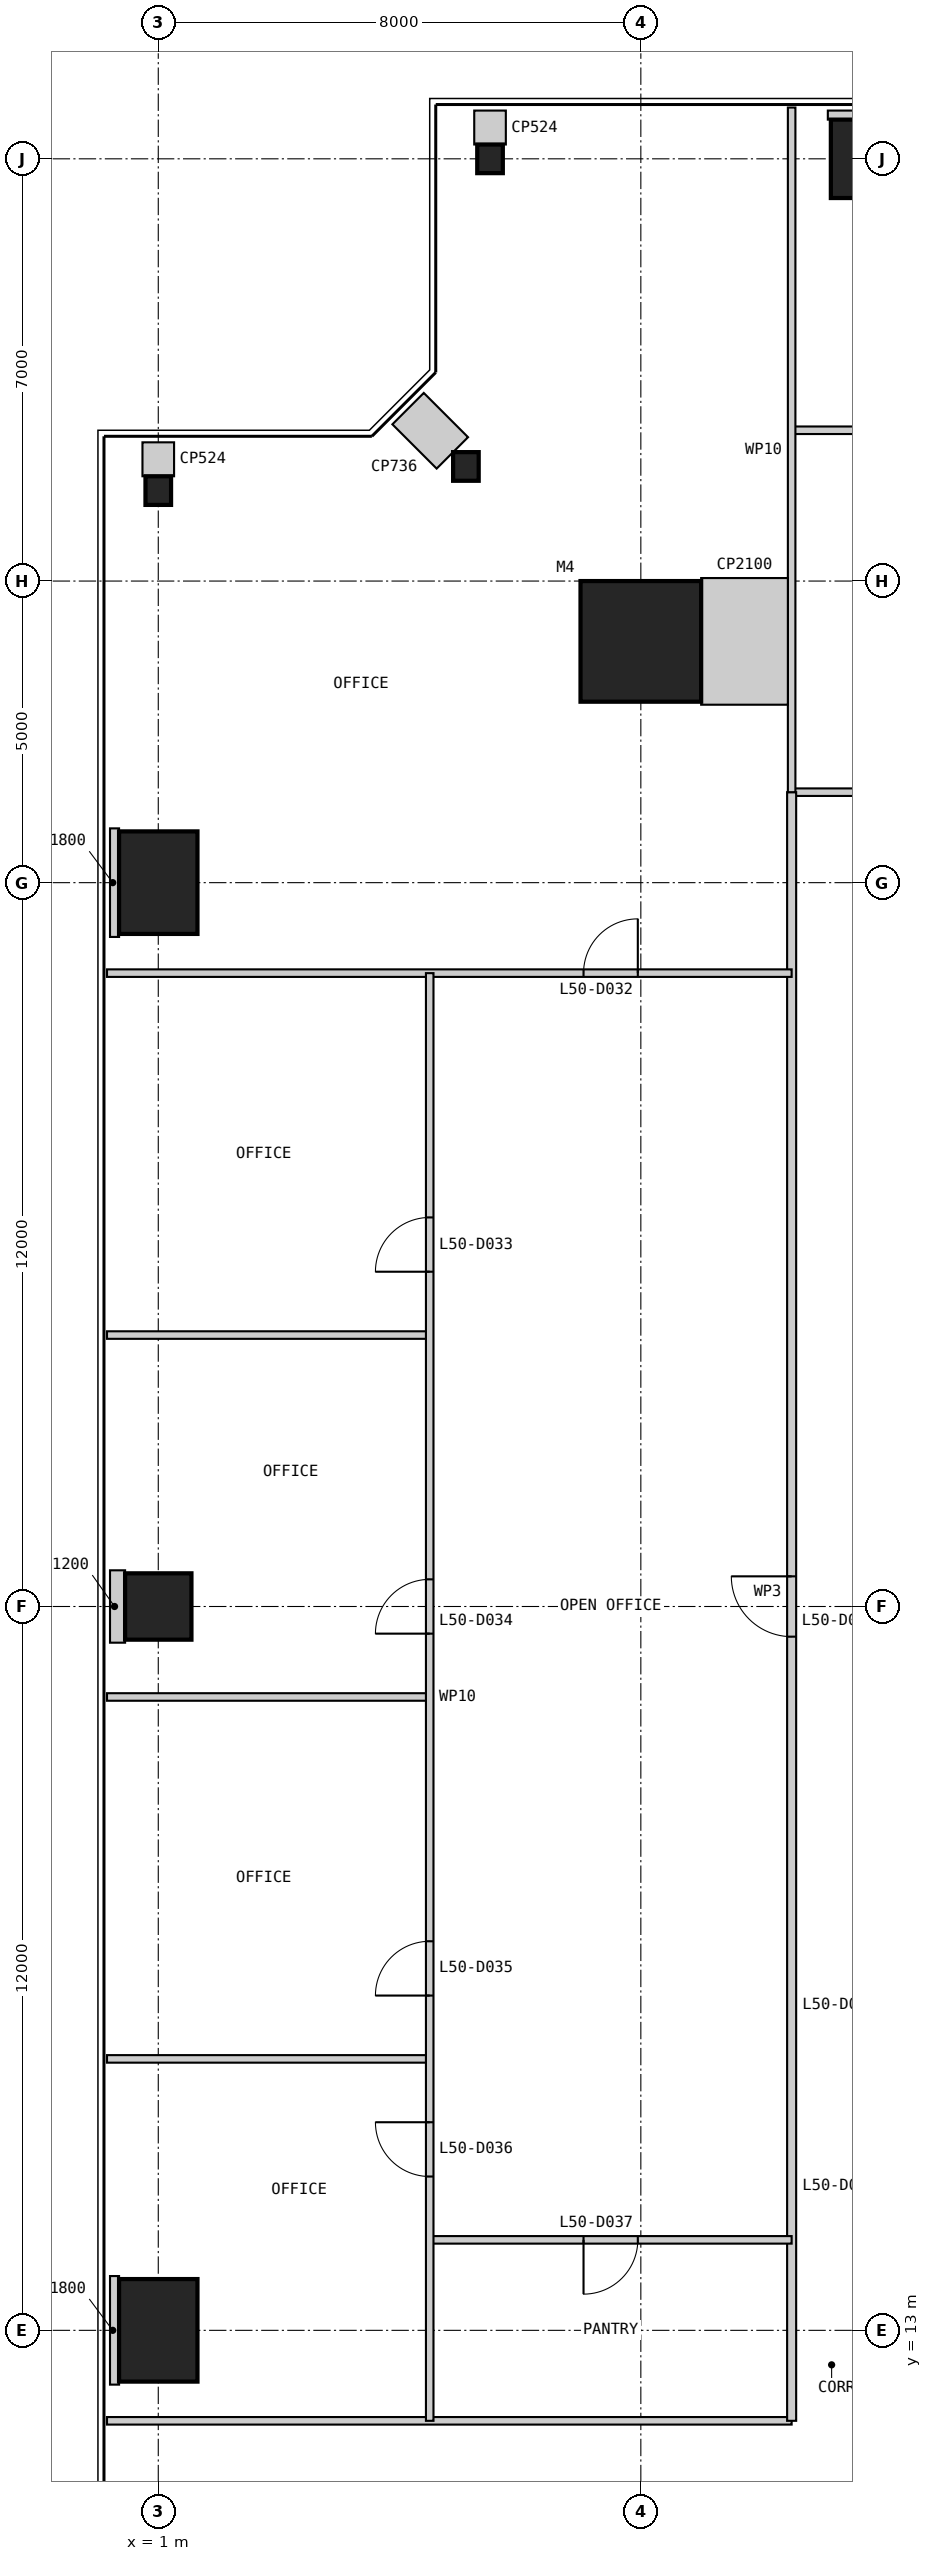
"""IFC4 building model, lengths in metres.
Left out: names, types, materials, properties, quantities, classifications, styles, units other than length and angle.
Written with IfcOpenShell. Run it as: python <this file> out.ifc"""

import sys

from ifc_helpers import new_model, si_unit, direction, frame, frame_2d, origin, origin_2d, place, context, subcontext, project, spatial, rectangle, i_section, extrude, element, fill, save


model = new_model("IFC4")
c1 = context("Model", 3, precision=1e-05, world=origin(), true_north=direction((0.0, 1.0)))
c2 = subcontext(c1, "Body", "Model", "MODEL_VIEW")
j1 = project(units=[si_unit("LENGTHUNIT", "METRE"), si_unit("PLANEANGLEUNIT", "RADIAN")], contexts=[c1])
p1 = place(None, origin())
s1 = spatial("IfcSite", under=j1, at=p1, CompositionType="ELEMENT")
p2 = place(p1, origin())
s2 = spatial("IfcBuilding", under=s1, at=p2, CompositionType="ELEMENT")
p3 = place(p2, frame((0.0, 0.0, 213.8)))
s3 = spatial("IfcBuildingStorey", under=s2, at=p3, CompositionType="ELEMENT", Elevation=213.8)
p4 = place(p3, frame((9.0, 41.0, 0.0), z_axis=(0.0, 0.0, 1.0), x_axis=(1.0, 0.0, 0.0)))
e1 = element("IfcColumn", 1, at=p4, inside=s3, PredefinedType="COLUMN", context=c2, shape_type="SweptSolid", body=[
    extrude(rectangle(XDim=2.0, YDim=2.0, at=origin_2d()), origin(), (0.0, 0.0, 1.0), 4.0),
])
p5 = place(p3, frame((13.0, 49.0, 0.0), z_axis=(0.0, 0.0, 1.0), x_axis=(1.0, 0.0, 0.0)))
e2 = element("IfcColumn", 2, at=p5, inside=s3, PredefinedType="COLUMN", context=c2, shape_type="SweptSolid", body=[
    extrude(rectangle(XDim=1.7, YDim=1.3, at=origin_2d()), origin(), (0.0, 0.0, 1.0), 4.0),
])
for number, where, z_axis, x_axis in (
    (3, (6.5, 49.0, 0.0), (0.0, 0.0, 1.0), (1.0, 0.0, 0.0)),
    (4, (6.1, 43.9, 0.0), (0.0, 0.0, 1.0), (1.0, 0.0, 0.0)),
    (5, (1.0, 43.5, 0.0), (0.0, 0.0, 1.0), (1.0, 0.0, 0.0)),
):
    element("IfcColumn", number, at=place(p3, frame(where, z_axis=z_axis, x_axis=x_axis)), inside=s3, PredefinedType="COLUMN", context=c2, shape_type="SweptSolid", body=[
        extrude(i_section(OverallWidth=0.424, OverallDepth=0.475, WebThickness=0.048, FlangeThickness=0.077, at=origin_2d()), origin(), (0.0, 0.0, 1.0), 4.0),
    ])
p6 = place(p3, frame((1.0, 37.0, 0.0), z_axis=(0.0, 0.0, 1.0), x_axis=(1.0, 0.0, 0.0)))
e6 = element("IfcColumn", 6, at=p6, inside=s3, PredefinedType="COLUMN", context=c2, shape_type="SweptSolid", body=[
    extrude(rectangle(XDim=1.3, YDim=1.7, at=origin_2d()), origin(), (0.0, 0.0, 1.0), 4.0),
])
p7 = place(p3, frame((1.0, 25.0, 0.0), z_axis=(0.0, 0.0, 1.0), x_axis=(1.0, 0.0, 0.0)))
e7 = element("IfcColumn", 7, at=p7, inside=s3, PredefinedType="COLUMN", context=c2, shape_type="SweptSolid", body=[
    extrude(rectangle(XDim=1.1, YDim=1.1, at=origin_2d()), origin(), (0.0, 0.0, 1.0), 4.0),
])
p8 = place(p3, frame((1.0, 13.0, 0.0), z_axis=(0.0, 0.0, 1.0), x_axis=(1.0, 0.0, 0.0)))
e8 = element("IfcColumn", 8, at=p8, inside=s3, PredefinedType="COLUMN", context=c2, shape_type="SweptSolid", body=[
    extrude(rectangle(XDim=1.3, YDim=1.7, at=origin_2d()), origin(), (0.0, 0.0, 1.0), 4.0),
])
p9 = place(p3, frame((0.15, 11.5, 0.0), z_axis=(0.0, 0.0, 1.0), x_axis=(1.0, 0.0, 0.0)))
e9 = element("IfcWall", 9, at=p9, inside=s3, PredefinedType="PARTITIONING", context=c2, shape_type="SweptSolid", body=[
    extrude(rectangle(XDim=11.35, YDim=0.125, at=frame_2d((5.675, 0.0))), origin(), (0.0, 0.0, 1.0), 3.85),
])
p10 = place(p3, frame((17.5, 44.5, 0.0), z_axis=(0.0, 0.0, 1.0), x_axis=(-1.0, 0.0, 0.0)))
e10 = element("IfcWall", 10, at=p10, inside=s3, PredefinedType="PARTITIONING", context=c2, shape_type="SweptSolid", body=[
    extrude(rectangle(XDim=6.0, YDim=0.125, at=frame_2d((3.0, 0.0))), origin(), (0.0, 0.0, 1.0), 3.85),
])
p11 = place(p3, frame((14.5, 38.5, 0.0), z_axis=(0.0, 0.0, 1.0), x_axis=(-1.0, 0.0, 0.0)))
e11 = element("IfcWall", 11, at=p11, inside=s3, PredefinedType="PARTITIONING", context=c2, shape_type="SweptSolid", body=[
    extrude(rectangle(XDim=3.0, YDim=0.125, at=frame_2d((1.5, 0.0))), origin(), (0.0, 0.0, 1.0), 3.85),
])
p12 = place(p3, frame((11.5, 38.5, 0.0), z_axis=(0.0, 0.0, 1.0), x_axis=(0.0, -1.0, 0.0)))
e12 = element("IfcWall", 12, at=p12, inside=s3, PredefinedType="PARTITIONING", context=c2, shape_type="SweptSolid", body=[
    extrude(rectangle(XDim=27.0, YDim=0.15, at=frame_2d((13.5, 0.0))), origin(), (0.0, 0.0, 1.0), 3.85),
])
p13 = place(p12, frame((13.0, 0.0, 0.0)))
e13 = element("IfcOpeningElement", 13, at=p13, cuts=e12, PredefinedType="OPENING", context=c2, shape_type="SweptSolid", body=[
    extrude(rectangle(XDim=1.0, YDim=2.2, at=frame_2d((0.5, 1.1))), frame((0.0, 0.085, 0.0), z_axis=(0.0, -1.0, 0.0), x_axis=(1.0, 0.0, 0.0)), (0.0, 0.0, 1.0), 0.17),
])
p14 = place(p3, frame((11.5, 49.85, 0.0), z_axis=(0.0, 0.0, 1.0), x_axis=(0.0, -1.0, 0.0)))
e14 = element("IfcWall", 14, at=p14, inside=s3, PredefinedType="PARTITIONING", context=c2, shape_type="SweptSolid", body=[
    extrude(rectangle(XDim=11.35, YDim=0.125, at=frame_2d((5.675, 0.0))), origin(), (0.0, 0.0, 1.0), 3.85),
])
p15 = place(p3, frame((0.15, 35.5, 0.0), z_axis=(0.0, 0.0, 1.0), x_axis=(1.0, 0.0, 0.0)))
e15 = element("IfcWall", 15, at=p15, inside=s3, PredefinedType="PARTITIONING", context=c2, shape_type="SweptSolid", body=[
    extrude(rectangle(XDim=11.35, YDim=0.125, at=frame_2d((5.675, 0.0))), origin(), (0.0, 0.0, 1.0), 3.85),
])
p16 = place(p15, frame((7.9, 0.0, 0.0)))
e16 = element("IfcOpeningElement", 16, at=p16, cuts=e15, PredefinedType="OPENING", context=c2, shape_type="SweptSolid", body=[
    extrude(rectangle(XDim=0.9, YDim=2.2, at=frame_2d((0.45, 1.1))), frame((0.0, 0.073, 0.0), z_axis=(0.0, -1.0, 0.0), x_axis=(1.0, 0.0, 0.0)), (0.0, 0.0, 1.0), 0.145),
])
for number, where, z_axis, x_axis in (
    (17, (0.15, 29.5, 0.0), (0.0, 0.0, 1.0), (1.0, 0.0, 0.0)),
    (18, (0.15, 23.5, 0.0), (0.0, 0.0, 1.0), (1.0, 0.0, 0.0)),
    (19, (0.15, 17.5, 0.0), (0.0, 0.0, 1.0), (1.0, 0.0, 0.0)),
):
    element("IfcWall", number, at=place(p3, frame(where, z_axis=z_axis, x_axis=x_axis)), inside=s3, PredefinedType="PARTITIONING", context=c2, shape_type="SweptSolid", body=[
        extrude(rectangle(XDim=5.35, YDim=0.125, at=frame_2d((2.675, 0.0))), origin(), (0.0, 0.0, 1.0), 3.85),
    ])
p17 = place(p3, frame((5.5, 14.5, 0.0), z_axis=(0.0, 0.0, 1.0), x_axis=(1.0, 0.0, 0.0)))
e20 = element("IfcWall", 20, at=p17, inside=s3, PredefinedType="PARTITIONING", context=c2, shape_type="SweptSolid", body=[
    extrude(rectangle(XDim=6.0, YDim=0.125, at=frame_2d((3.0, 0.0))), origin(), (0.0, 0.0, 1.0), 3.85),
])
p18 = place(p17, frame((2.55, 0.0, 0.0)))
e21 = element("IfcOpeningElement", 21, at=p18, cuts=e20, PredefinedType="OPENING", context=c2, shape_type="SweptSolid", body=[
    extrude(rectangle(XDim=0.9, YDim=2.2, at=frame_2d((0.45, 1.1))), frame((0.0, 0.073, 0.0), z_axis=(0.0, -1.0, 0.0), x_axis=(1.0, 0.0, 0.0)), (0.0, 0.0, 1.0), 0.145),
])
p19 = place(p3, frame((5.5, 35.5, 0.0), z_axis=(0.0, 0.0, 1.0), x_axis=(0.0, -1.0, 0.0)))
e22 = element("IfcWall", 22, at=p19, inside=s3, PredefinedType="PARTITIONING", context=c2, shape_type="SweptSolid", body=[
    extrude(rectangle(XDim=24.0, YDim=0.125, at=frame_2d((12.0, 0.0))), origin(), (0.0, 0.0, 1.0), 3.85),
])
p20 = place(p19, frame((4.05, 0.0, 0.0)))
e23 = element("IfcOpeningElement", 23, at=p20, cuts=e22, PredefinedType="OPENING", context=c2, shape_type="SweptSolid", body=[
    extrude(rectangle(XDim=0.9, YDim=2.2, at=frame_2d((0.45, 1.1))), frame((0.0, 0.073, 0.0), z_axis=(0.0, -1.0, 0.0), x_axis=(1.0, 0.0, 0.0)), (0.0, 0.0, 1.0), 0.145),
])
p21 = place(p19, frame((10.05, 0.0, 0.0)))
e24 = element("IfcOpeningElement", 24, at=p21, cuts=e22, PredefinedType="OPENING", context=c2, shape_type="SweptSolid", body=[
    extrude(rectangle(XDim=0.9, YDim=2.2, at=frame_2d((0.45, 1.1))), frame((0.0, 0.073, 0.0), z_axis=(0.0, -1.0, 0.0), x_axis=(1.0, 0.0, 0.0)), (0.0, 0.0, 1.0), 0.145),
])
p22 = place(p19, frame((16.05, 0.0, 0.0)))
e25 = element("IfcOpeningElement", 25, at=p22, cuts=e22, PredefinedType="OPENING", context=c2, shape_type="SweptSolid", body=[
    extrude(rectangle(XDim=0.9, YDim=2.2, at=frame_2d((0.45, 1.1))), frame((0.0, 0.073, 0.0), z_axis=(0.0, -1.0, 0.0), x_axis=(1.0, 0.0, 0.0)), (0.0, 0.0, 1.0), 0.145),
])
p23 = place(p19, frame((19.05, 0.0, 0.0)))
e26 = element("IfcOpeningElement", 26, at=p23, cuts=e22, PredefinedType="OPENING", context=c2, shape_type="SweptSolid", body=[
    extrude(rectangle(XDim=0.9, YDim=2.2, at=frame_2d((0.45, 1.1))), frame((0.0, 0.073, 0.0), z_axis=(0.0, -1.0, 0.0), x_axis=(1.0, 0.0, 0.0)), (0.0, 0.0, 1.0), 0.145),
])
p24 = place(p3, frame((13.0, 49.8, 0.0), z_axis=(0.0, 0.0, 1.0), x_axis=(0.0, -1.0, 0.0)))
e27 = element("IfcWall", 27, at=p24, inside=s3, PredefinedType="PARTITIONING", context=c2, shape_type="SweptSolid", body=[
    extrude(rectangle(XDim=0.15, YDim=1.8, at=frame_2d((0.075, 0.0))), origin(), (0.0, 0.0, 1.0), 3.85),
])
p25 = place(p3, frame((11.438, 41.0, 0.0), z_axis=(0.0, 0.0, 1.0), x_axis=(-1.0, 0.0, 0.0)))
e28 = element("IfcWall", 28, at=p25, inside=s3, PredefinedType="PARTITIONING", context=c2, shape_type="SweptSolid", body=[
    extrude(rectangle(XDim=1.438, YDim=2.1, at=frame_2d((0.719, 0.0))), origin(), (0.0, 0.0, 1.0), 3.85),
])
p26 = place(p3, frame((6.5, 49.8, 0.0), z_axis=(0.0, 0.0, 1.0), x_axis=(0.0, -1.0, 0.0)))
e29 = element("IfcWall", 29, at=p26, inside=s3, PredefinedType="PARTITIONING", context=c2, shape_type="SweptSolid", body=[
    extrude(rectangle(XDim=0.562, YDim=0.524, at=frame_2d((0.281, 0.0))), origin(), (0.0, 0.0, 1.0), 3.85),
])
p27 = place(p3, frame((5.141, 44.859, 0.0), z_axis=(0.0, 0.0, 1.0), x_axis=(0.707106781187, -0.707106781187, 0.0)))
e30 = element("IfcWall", 30, at=p27, inside=s3, PredefinedType="PARTITIONING", context=c2, shape_type="SweptSolid", body=[
    extrude(rectangle(XDim=1.038, YDim=0.736, at=frame_2d((0.519, 0.0))), origin(), (0.0, 0.0, 1.0), 3.85),
])
p28 = place(p3, frame((1.0, 44.3, 0.0), z_axis=(0.0, 0.0, 1.0), x_axis=(0.0, -1.0, 0.0)))
e31 = element("IfcWall", 31, at=p28, inside=s3, PredefinedType="PARTITIONING", context=c2, shape_type="SweptSolid", body=[
    extrude(rectangle(XDim=0.562, YDim=0.524, at=frame_2d((0.281, 0.0))), origin(), (0.0, 0.0, 1.0), 3.85),
])
p29 = place(p3, frame((0.2, 37.0, 0.0), z_axis=(0.0, 0.0, 1.0), x_axis=(1.0, 0.0, 0.0)))
e32 = element("IfcWall", 32, at=p29, inside=s3, PredefinedType="PARTITIONING", context=c2, shape_type="SweptSolid", body=[
    extrude(rectangle(XDim=0.15, YDim=1.8, at=frame_2d((0.075, 0.0))), origin(), (0.0, 0.0, 1.0), 3.85),
])
p30 = place(p3, frame((0.2, 25.0, 0.0), z_axis=(0.0, 0.0, 1.0), x_axis=(1.0, 0.0, 0.0)))
e33 = element("IfcWall", 33, at=p30, inside=s3, PredefinedType="PARTITIONING", context=c2, shape_type="SweptSolid", body=[
    extrude(rectangle(XDim=0.25, YDim=1.2, at=frame_2d((0.125, 0.0))), origin(), (0.0, 0.0, 1.0), 3.85),
])
p31 = place(p3, frame((0.2, 13.0, 0.0), z_axis=(0.0, 0.0, 1.0), x_axis=(1.0, 0.0, 0.0)))
e34 = element("IfcWall", 34, at=p31, inside=s3, PredefinedType="PARTITIONING", context=c2, shape_type="SweptSolid", body=[
    extrude(rectangle(XDim=0.15, YDim=1.8, at=frame_2d((0.075, 0.0))), origin(), (0.0, 0.0, 1.0), 3.85),
])
p32 = place(p13, frame((1.0, 0.0, 0.0), z_axis=(0.0, 0.0, 1.0), x_axis=(-1.0, 0.0, 0.0)))
e35 = element("IfcDoor", 35, at=p32, inside=s3, OperationType="SINGLE_SWING_RIGHT", PredefinedType="DOOR", context=c2, shape_type="SweptSolid", body=[
    extrude(rectangle(XDim=1.0, YDim=2.2, at=frame_2d((0.5, 1.1))), frame((0.0, 0.025, 0.0), z_axis=(0.0, -1.0, 0.0), x_axis=(1.0, 0.0, 0.0)), (0.0, 0.0, 1.0), 0.05),
])
fill(e13, e35)
p33 = place(p16, origin())
e36 = element("IfcDoor", 36, at=p33, inside=s3, OperationType="SINGLE_SWING_RIGHT", PredefinedType="DOOR", context=c2, shape_type="SweptSolid", body=[
    extrude(rectangle(XDim=0.9, YDim=2.2, at=frame_2d((0.45, 1.1))), frame((0.0, 0.025, 0.0), z_axis=(0.0, -1.0, 0.0), x_axis=(1.0, 0.0, 0.0)), (0.0, 0.0, 1.0), 0.05),
])
fill(e16, e36)
p34 = place(p20, frame((0.9, 0.0, 0.0), z_axis=(0.0, 0.0, 1.0), x_axis=(-1.0, 0.0, 0.0)))
e37 = element("IfcDoor", 37, at=p34, inside=s3, OperationType="SINGLE_SWING_LEFT", PredefinedType="DOOR", context=c2, shape_type="SweptSolid", body=[
    extrude(rectangle(XDim=0.9, YDim=2.2, at=frame_2d((0.45, 1.1))), frame((0.0, 0.025, 0.0), z_axis=(0.0, -1.0, 0.0), x_axis=(1.0, 0.0, 0.0)), (0.0, 0.0, 1.0), 0.05),
])
fill(e23, e37)
p35 = place(p21, frame((0.9, 0.0, 0.0), z_axis=(0.0, 0.0, 1.0), x_axis=(-1.0, 0.0, 0.0)))
e38 = element("IfcDoor", 38, at=p35, inside=s3, OperationType="SINGLE_SWING_LEFT", PredefinedType="DOOR", context=c2, shape_type="SweptSolid", body=[
    extrude(rectangle(XDim=0.9, YDim=2.2, at=frame_2d((0.45, 1.1))), frame((0.0, 0.025, 0.0), z_axis=(0.0, -1.0, 0.0), x_axis=(1.0, 0.0, 0.0)), (0.0, 0.0, 1.0), 0.05),
])
fill(e24, e38)
p36 = place(p22, frame((0.9, 0.0, 0.0), z_axis=(0.0, 0.0, 1.0), x_axis=(-1.0, 0.0, 0.0)))
e39 = element("IfcDoor", 39, at=p36, inside=s3, OperationType="SINGLE_SWING_LEFT", PredefinedType="DOOR", context=c2, shape_type="SweptSolid", body=[
    extrude(rectangle(XDim=0.9, YDim=2.2, at=frame_2d((0.45, 1.1))), frame((0.0, 0.025, 0.0), z_axis=(0.0, -1.0, 0.0), x_axis=(1.0, 0.0, 0.0)), (0.0, 0.0, 1.0), 0.05),
])
fill(e25, e39)
p37 = place(p23, frame((0.9, 0.0, 0.0), z_axis=(0.0, 0.0, 1.0), x_axis=(-1.0, 0.0, 0.0)))
e40 = element("IfcDoor", 40, at=p37, inside=s3, OperationType="SINGLE_SWING_RIGHT", PredefinedType="DOOR", context=c2, shape_type="SweptSolid", body=[
    extrude(rectangle(XDim=0.9, YDim=2.2, at=frame_2d((0.45, 1.1))), frame((0.0, 0.025, 0.0), z_axis=(0.0, -1.0, 0.0), x_axis=(1.0, 0.0, 0.0)), (0.0, 0.0, 1.0), 0.05),
])
fill(e26, e40)
p38 = place(p18, frame((0.9, 0.0, 0.0), z_axis=(0.0, 0.0, 1.0), x_axis=(-1.0, 0.0, 0.0)))
e41 = element("IfcDoor", 41, at=p38, inside=s3, OperationType="SINGLE_SWING_RIGHT", PredefinedType="DOOR", context=c2, shape_type="SweptSolid", body=[
    extrude(rectangle(XDim=0.9, YDim=2.2, at=frame_2d((0.45, 1.1))), frame((0.0, 0.025, 0.0), z_axis=(0.0, -1.0, 0.0), x_axis=(1.0, 0.0, 0.0)), (0.0, 0.0, 1.0), 0.05),
])
fill(e21, e41)
save(model, sys.argv[1])
